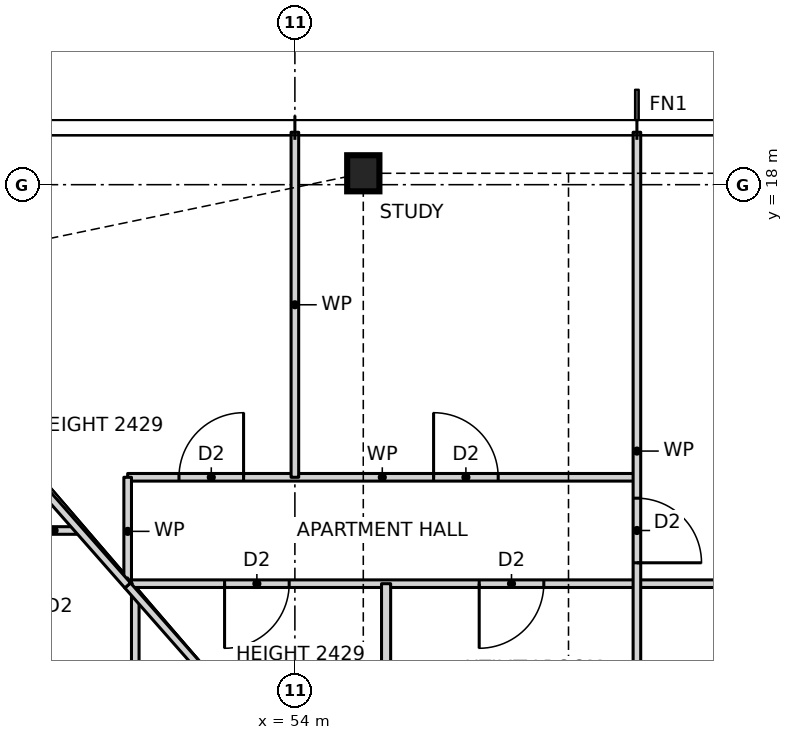
"""IFC4 building model, lengths in metres.
Left out: names, types, materials, properties, quantities, classifications, styles, units other than length and angle.
Written with IfcOpenShell. Run it as: python <this file> out.ifc"""

import sys

from ifc_helpers import new_model, si_unit, direction, frame, frame_2d, origin, origin_2d, place, context, subcontext, project, spatial, rectangle, i_section, extrude, element, fill, save


model = new_model("IFC4")
c1 = context("Model", 3, precision=1e-05, world=origin(), true_north=direction((0.0, 1.0)))
c2 = subcontext(c1, "Body", "Model", "MODEL_VIEW")
j1 = project(units=[si_unit("LENGTHUNIT", "METRE"), si_unit("PLANEANGLEUNIT", "RADIAN")], contexts=[c1])
p1 = place(None, origin())
s1 = spatial("IfcSite", under=j1, at=p1, CompositionType="ELEMENT")
p2 = place(p1, origin())
s2 = spatial("IfcBuilding", under=s1, at=p2, CompositionType="ELEMENT")
p3 = place(p2, frame((0.0, 0.0, 18.5)))
s3 = spatial("IfcBuildingStorey", under=s2, at=p3, CompositionType="ELEMENT", Elevation=18.5)
p4 = place(p3, frame((54.9, 18.15, 0.0), z_axis=(0.0, 0.0, 1.0), x_axis=(1.0, 0.0, 0.0)))
e1 = element("IfcColumn", 1, at=p4, inside=s3, PredefinedType="COLUMN", context=c2, shape_type="SweptSolid", body=[
    extrude(i_section(OverallWidth=0.424, OverallDepth=0.475, WebThickness=0.048, FlangeThickness=0.077, at=origin_2d()), origin(), (0.0, 0.0, 1.0), 3.5),
])
p5 = place(p3, frame((51.8, 12.75, 0.0), z_axis=(0.0, 0.0, 1.0), x_axis=(1.0, 0.0, 0.0)))
e2 = element("IfcWall", 2, at=p5, inside=s3, PredefinedType="PARTITIONING", context=c2, shape_type="SweptSolid", body=[
    extrude(rectangle(XDim=22.4, YDim=0.1, at=frame_2d((11.2, 0.0))), origin(), (0.0, 0.0, 1.0), 3.27),
])
p6 = place(p5, frame((13.475, 0.0, 0.0)))
e3 = element("IfcOpeningElement", 3, at=p6, cuts=e2, PredefinedType="OPENING", context=c2, shape_type="SweptSolid", body=[
    extrude(rectangle(XDim=0.85, YDim=2.1, at=frame_2d((0.425, 1.05))), frame((0.0, 0.06, 0.0), z_axis=(0.0, -1.0, 0.0), x_axis=(1.0, 0.0, 0.0)), (0.0, 0.0, 1.0), 0.12),
])
p7 = place(p5, frame((10.275, 0.0, 0.0)))
e4 = element("IfcOpeningElement", 4, at=p7, cuts=e2, PredefinedType="OPENING", context=c2, shape_type="SweptSolid", body=[
    extrude(rectangle(XDim=0.85, YDim=2.1, at=frame_2d((0.425, 1.05))), frame((0.0, 0.06, 0.0), z_axis=(0.0, -1.0, 0.0), x_axis=(1.0, 0.0, 0.0)), (0.0, 0.0, 1.0), 0.12),
])
p8 = place(p5, frame((16.925, 0.0, 0.0)))
e5 = element("IfcOpeningElement", 5, at=p8, cuts=e2, PredefinedType="OPENING", context=c2, shape_type="SweptSolid", body=[
    extrude(rectangle(XDim=0.85, YDim=2.1, at=frame_2d((0.425, 1.05))), frame((0.0, 0.06, 0.0), z_axis=(0.0, -1.0, 0.0), x_axis=(1.0, 0.0, 0.0)), (0.0, 0.0, 1.0), 0.12),
])
p9 = place(p5, frame((20.275, 0.0, 0.0)))
e6 = element("IfcOpeningElement", 6, at=p9, cuts=e2, PredefinedType="OPENING", context=c2, shape_type="SweptSolid", body=[
    extrude(rectangle(XDim=0.85, YDim=2.1, at=frame_2d((0.425, 1.05))), frame((0.0, 0.06, 0.0), z_axis=(0.0, -1.0, 0.0), x_axis=(1.0, 0.0, 0.0)), (0.0, 0.0, 1.0), 0.12),
])
p10 = place(p5, frame((4.625, 0.0, 0.0)))
e7 = element("IfcOpeningElement", 7, at=p10, cuts=e2, PredefinedType="OPENING", context=c2, shape_type="SweptSolid", body=[
    extrude(rectangle(XDim=0.85, YDim=2.1, at=frame_2d((0.425, 1.05))), frame((0.0, 0.06, 0.0), z_axis=(0.0, -1.0, 0.0), x_axis=(1.0, 0.0, 0.0)), (0.0, 0.0, 1.0), 0.12),
])
p11 = place(p5, frame((1.275, 0.0, 0.0)))
e8 = element("IfcOpeningElement", 8, at=p11, cuts=e2, PredefinedType="OPENING", context=c2, shape_type="SweptSolid", body=[
    extrude(rectangle(XDim=0.85, YDim=2.1, at=frame_2d((0.425, 1.05))), frame((0.0, 0.06, 0.0), z_axis=(0.0, -1.0, 0.0), x_axis=(1.0, 0.0, 0.0)), (0.0, 0.0, 1.0), 0.12),
])
p12 = place(p3, frame((50.5, 13.45, 0.0), z_axis=(0.0, 0.0, 1.0), x_axis=(1.0, 0.0, 0.0)))
e9 = element("IfcWall", 9, at=p12, inside=s3, PredefinedType="PARTITIONING", context=c2, shape_type="SweptSolid", body=[
    extrude(rectangle(XDim=0.664, YDim=0.1, at=frame_2d((0.332, 0.0))), origin(), (0.0, 0.0, 1.0), 3.27),
])
p13 = place(p3, frame((51.8, 14.15, 0.0), z_axis=(0.0, 0.0, 1.0), x_axis=(1.0, 0.0, 0.0)))
e10 = element("IfcWall", 10, at=p13, inside=s3, PredefinedType="PARTITIONING", context=c2, shape_type="SweptSolid", body=[
    extrude(rectangle(XDim=6.7, YDim=0.1, at=frame_2d((3.35, 0.0))), origin(), (0.0, 0.0, 1.0), 3.27),
])
p14 = place(p13, frame((4.025, 0.0, 0.0)))
e11 = element("IfcOpeningElement", 11, at=p14, cuts=e10, PredefinedType="OPENING", context=c2, shape_type="SweptSolid", body=[
    extrude(rectangle(XDim=0.85, YDim=2.1, at=frame_2d((0.425, 1.05))), frame((0.0, 0.06, 0.0), z_axis=(0.0, -1.0, 0.0), x_axis=(1.0, 0.0, 0.0)), (0.0, 0.0, 1.0), 0.12),
])
p15 = place(p13, frame((0.675, 0.0, 0.0)))
e12 = element("IfcOpeningElement", 12, at=p15, cuts=e10, PredefinedType="OPENING", context=c2, shape_type="SweptSolid", body=[
    extrude(rectangle(XDim=0.85, YDim=2.1, at=frame_2d((0.425, 1.05))), frame((0.0, 0.06, 0.0), z_axis=(0.0, -1.0, 0.0), x_axis=(1.0, 0.0, 0.0)), (0.0, 0.0, 1.0), 0.12),
])
p16 = place(p3, frame((58.5, 10.3, 0.0), z_axis=(0.0, 0.0, 1.0), x_axis=(0.0, 1.0, 0.0)))
e13 = element("IfcWall", 13, at=p16, inside=s3, PredefinedType="PARTITIONING", context=c2, shape_type="SweptSolid", body=[
    extrude(rectangle(XDim=8.39, YDim=0.1, at=frame_2d((4.195, 0.0))), origin(), (0.0, 0.0, 1.0), 3.27),
])
p17 = place(p16, frame((2.725, 0.0, 0.0)))
e14 = element("IfcOpeningElement", 14, at=p17, cuts=e13, PredefinedType="OPENING", context=c2, shape_type="SweptSolid", body=[
    extrude(rectangle(XDim=0.85, YDim=2.1, at=frame_2d((0.425, 1.05))), frame((0.0, 0.06, 0.0), z_axis=(0.0, -1.0, 0.0), x_axis=(1.0, 0.0, 0.0)), (0.0, 0.0, 1.0), 0.12),
])
p18 = place(p3, frame((55.2, 10.3, 0.0), z_axis=(0.0, 0.0, 1.0), x_axis=(0.0, 1.0, 0.0)))
e15 = element("IfcWall", 15, at=p18, inside=s3, PredefinedType="PARTITIONING", context=c2, shape_type="SweptSolid", body=[
    extrude(rectangle(XDim=2.45, YDim=0.12, at=frame_2d((1.225, 0.0))), origin(), (0.0, 0.0, 1.0), 3.27),
])
p19 = place(p3, frame((54.0, 14.15, 0.0), z_axis=(0.0, 0.0, 1.0), x_axis=(0.0, 1.0, 0.0)))
e16 = element("IfcWall", 16, at=p19, inside=s3, PredefinedType="PARTITIONING", context=c2, shape_type="SweptSolid", body=[
    extrude(rectangle(XDim=4.54, YDim=0.1, at=frame_2d((2.27, 0.0))), origin(), (0.0, 0.0, 1.0), 3.27),
])
p20 = place(p3, frame((51.9, -12.614, 0.0), z_axis=(0.0, 0.0, 1.0), x_axis=(0.0, 1.0, 0.0)))
e17 = element("IfcWall", 17, at=p20, inside=s3, PredefinedType="PARTITIONING", context=c2, shape_type="SweptSolid", body=[
    extrude(rectangle(XDim=25.228, YDim=0.1, at=frame_2d((12.614, 0.0))), origin(), (0.0, 0.0, 1.0), 3.27),
])
p21 = place(p20, frame((12.639, 0.0, 0.0)))
e18 = element("IfcOpeningElement", 18, at=p21, cuts=e17, PredefinedType="OPENING", context=c2, shape_type="SweptSolid", body=[
    extrude(rectangle(XDim=0.85, YDim=2.1, at=frame_2d((0.425, 1.05))), frame((0.0, 0.06, 0.0), z_axis=(0.0, -1.0, 0.0), x_axis=(1.0, 0.0, 0.0)), (0.0, 0.0, 1.0), 0.12),
])
p22 = place(p20, frame((9.439, 0.0, 0.0)))
e19 = element("IfcOpeningElement", 19, at=p22, cuts=e17, PredefinedType="OPENING", context=c2, shape_type="SweptSolid", body=[
    extrude(rectangle(XDim=0.85, YDim=2.1, at=frame_2d((0.425, 1.05))), frame((0.0, 0.06, 0.0), z_axis=(0.0, -1.0, 0.0), x_axis=(1.0, 0.0, 0.0)), (0.0, 0.0, 1.0), 0.12),
])
p23 = place(p20, frame((16.639, 0.0, 0.0)))
e20 = element("IfcOpeningElement", 20, at=p23, cuts=e17, PredefinedType="OPENING", context=c2, shape_type="SweptSolid", body=[
    extrude(rectangle(XDim=0.85, YDim=2.1, at=frame_2d((0.425, 1.05))), frame((0.0, 0.06, 0.0), z_axis=(0.0, -1.0, 0.0), x_axis=(1.0, 0.0, 0.0)), (0.0, 0.0, 1.0), 0.12),
])
p24 = place(p20, frame((21.821, 0.0, 0.0)))
e21 = element("IfcOpeningElement", 21, at=p24, cuts=e17, PredefinedType="OPENING", context=c2, shape_type="SweptSolid", body=[
    extrude(rectangle(XDim=0.85, YDim=2.1, at=frame_2d((0.425, 1.05))), frame((0.0, 0.06, 0.0), z_axis=(0.0, -1.0, 0.0), x_axis=(1.0, 0.0, 0.0)), (0.0, 0.0, 1.0), 0.12),
])
p25 = place(p20, frame((2.507, 0.0, 0.0)))
e22 = element("IfcOpeningElement", 22, at=p25, cuts=e17, PredefinedType="OPENING", context=c2, shape_type="SweptSolid", body=[
    extrude(rectangle(XDim=0.85, YDim=2.1, at=frame_2d((0.425, 1.05))), frame((0.0, 0.06, 0.0), z_axis=(0.0, -1.0, 0.0), x_axis=(1.0, 0.0, 0.0)), (0.0, 0.0, 1.0), 0.12),
])
p26 = place(p3, frame((51.8, 12.727, 0.0), z_axis=(0.0, 0.0, 1.0), x_axis=(0.0, 1.0, 0.0)))
e23 = element("IfcWall", 23, at=p26, inside=s3, PredefinedType="PARTITIONING", context=c2, shape_type="SweptSolid", body=[
    extrude(rectangle(XDim=1.423, YDim=0.1, at=frame_2d((0.711, 0.0))), origin(), (0.0, 0.0, 1.0), 3.27),
])
p27 = place(p3, frame((53.936, 10.3, 0.0), z_axis=(0.0, 0.0, 1.0), x_axis=(-0.660667046586, 0.75067906162, 0.0)))
e24 = element("IfcWall", 24, at=p27, inside=s3, PredefinedType="PARTITIONING", context=c2, shape_type="SweptSolid", body=[
    extrude(rectangle(XDim=3.233, YDim=0.1, at=frame_2d((1.617, 0.0))), origin(), (0.0, 0.0, 1.0), 2.429),
])
p28 = place(p3, frame((51.8, 12.727, 0.0), z_axis=(0.0, 0.0, 1.0), x_axis=(-0.660690123093, 0.750658751529, 0.0)))
e25 = element("IfcWall", 25, at=p28, inside=s3, PredefinedType="PARTITIONING", context=c2, shape_type="SweptSolid", body=[
    extrude(rectangle(XDim=5.837, YDim=0.1, at=frame_2d((2.918, 0.0))), origin(), (0.0, 0.0, 1.0), 2.429),
])
p29 = place(p17, frame((0.85, 0.0, 0.0), z_axis=(0.0, 0.0, 1.0), x_axis=(-1.0, 0.0, 0.0)))
e26 = element("IfcDoor", 26, at=p29, inside=s3, OperationType="SINGLE_SWING_RIGHT", PredefinedType="DOOR", context=c2, shape_type="SweptSolid", body=[
    extrude(rectangle(XDim=0.85, YDim=2.1, at=frame_2d((0.425, 1.05))), frame((0.0, 0.025, 0.0), z_axis=(0.0, -1.0, 0.0), x_axis=(1.0, 0.0, 0.0)), (0.0, 0.0, 1.0), 0.05),
])
fill(e14, e26)
p30 = place(p14, origin())
e27 = element("IfcDoor", 27, at=p30, inside=s3, OperationType="SINGLE_SWING_LEFT", PredefinedType="DOOR", context=c2, shape_type="SweptSolid", body=[
    extrude(rectangle(XDim=0.85, YDim=2.1, at=frame_2d((0.425, 1.05))), frame((0.0, 0.025, 0.0), z_axis=(0.0, -1.0, 0.0), x_axis=(1.0, 0.0, 0.0)), (0.0, 0.0, 1.0), 0.05),
])
fill(e11, e27)
p31 = place(p15, origin())
e28 = element("IfcDoor", 28, at=p31, inside=s3, OperationType="SINGLE_SWING_RIGHT", PredefinedType="DOOR", context=c2, shape_type="SweptSolid", body=[
    extrude(rectangle(XDim=0.85, YDim=2.1, at=frame_2d((0.425, 1.05))), frame((0.0, 0.025, 0.0), z_axis=(0.0, -1.0, 0.0), x_axis=(1.0, 0.0, 0.0)), (0.0, 0.0, 1.0), 0.05),
])
fill(e12, e28)
p32 = place(p10, frame((0.85, 0.0, 0.0), z_axis=(0.0, 0.0, 1.0), x_axis=(-1.0, 0.0, 0.0)))
e29 = element("IfcDoor", 29, at=p32, inside=s3, OperationType="SINGLE_SWING_RIGHT", PredefinedType="DOOR", context=c2, shape_type="SweptSolid", body=[
    extrude(rectangle(XDim=0.85, YDim=2.1, at=frame_2d((0.425, 1.05))), frame((0.0, 0.025, 0.0), z_axis=(0.0, -1.0, 0.0), x_axis=(1.0, 0.0, 0.0)), (0.0, 0.0, 1.0), 0.05),
])
fill(e7, e29)
p33 = place(p11, frame((0.85, 0.0, 0.0), z_axis=(0.0, 0.0, 1.0), x_axis=(-1.0, 0.0, 0.0)))
e30 = element("IfcDoor", 30, at=p33, inside=s3, OperationType="SINGLE_SWING_RIGHT", PredefinedType="DOOR", context=c2, shape_type="SweptSolid", body=[
    extrude(rectangle(XDim=0.85, YDim=2.1, at=frame_2d((0.425, 1.05))), frame((0.0, 0.025, 0.0), z_axis=(0.0, -1.0, 0.0), x_axis=(1.0, 0.0, 0.0)), (0.0, 0.0, 1.0), 0.05),
])
fill(e8, e30)
save(model, sys.argv[1])
